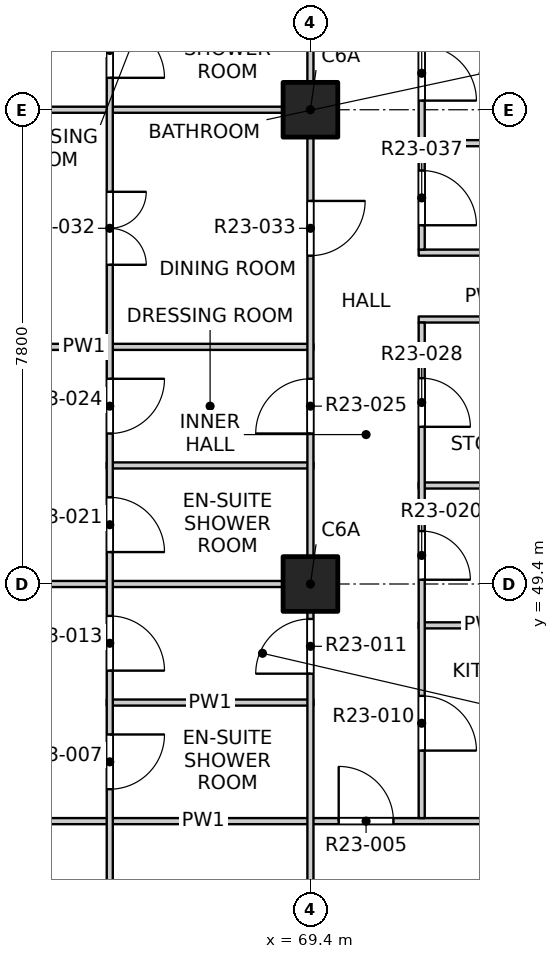
"""IFC4 building model, lengths in metres.
Left out: names, types, materials, properties, quantities, classifications, styles, units other than length and angle.
Written with IfcOpenShell. Run it as: python <this file> out.ifc"""

import sys

from ifc_helpers import new_model, si_unit, direction, frame, frame_2d, origin, origin_2d, place, context, subcontext, project, spatial, rectangle, extrude, element, fill, save


model = new_model("IFC4")
c1 = context("Model", 3, precision=1e-05, world=origin(), true_north=direction((0.0, 1.0)))
c2 = subcontext(c1, "Body", "Model", "MODEL_VIEW")
j1 = project(units=[si_unit("LENGTHUNIT", "METRE"), si_unit("PLANEANGLEUNIT", "RADIAN")], contexts=[c1])
p1 = place(None, origin())
s1 = spatial("IfcSite", under=j1, at=p1, CompositionType="ELEMENT")
p2 = place(p1, origin())
s2 = spatial("IfcBuilding", under=s1, at=p2, CompositionType="ELEMENT")
p3 = place(p2, frame((0.0, 0.0, 234.7)))
s3 = spatial("IfcBuildingStorey", under=s2, at=p3, CompositionType="ELEMENT", Elevation=234.7)
for number, where, z_axis, x_axis in (
    (1, (69.4, 49.4, -0.25), (0.0, 0.0, 1.0), (1.0, 0.0, 0.0)),
    (2, (69.4, 57.2, -0.25), (0.0, 0.0, 1.0), (1.0, 0.0, 0.0)),
):
    element("IfcColumn", number, at=place(p3, frame(where, z_axis=z_axis, x_axis=x_axis)), inside=s3, PredefinedType="COLUMN", context=c2, shape_type="SweptSolid", body=[
        extrude(rectangle(XDim=0.9, YDim=0.9, at=origin_2d()), origin(), (0.0, 0.0, 1.0), 3.4),
    ])
p4 = place(p3, frame((61.9, 45.5, 0.0), z_axis=(0.0, 0.0, 1.0), x_axis=(1.0, 0.0, 0.0)))
e3 = element("IfcWall", 3, at=p4, inside=s3, PredefinedType="PARTITIONING", context=c2, shape_type="SweptSolid", body=[
    extrude(rectangle(XDim=11.475, YDim=0.1, at=frame_2d((5.737, 0.0))), origin(), (0.0, 0.0, 1.0), 3.15),
])
p5 = place(p4, frame((7.965, 0.0, 0.0)))
e4 = element("IfcOpeningElement", 4, at=p5, cuts=e3, PredefinedType="OPENING", context=c2, shape_type="SweptSolid", body=[
    extrude(rectangle(XDim=0.9, YDim=2.1, at=frame_2d((0.45, 1.05))), frame((0.0, 0.06, 0.0), z_axis=(0.0, -1.0, 0.0), x_axis=(1.0, 0.0, 0.0)), (0.0, 0.0, 1.0), 0.12),
])
p6 = place(p3, frame((66.05, 47.45, 0.0), z_axis=(0.0, 0.0, 1.0), x_axis=(1.0, 0.0, 0.0)))
e5 = element("IfcWall", 5, at=p6, inside=s3, PredefinedType="PARTITIONING", context=c2, shape_type="SweptSolid", body=[
    extrude(rectangle(XDim=3.4, YDim=0.1, at=frame_2d((1.7, 0.0))), origin(), (0.0, 0.0, 1.0), 3.15),
])
p7 = place(p3, frame((71.18, 48.72, 0.0), z_axis=(0.0, 0.0, 1.0), x_axis=(1.0, 0.0, 0.0)))
e6 = element("IfcWall", 6, at=p7, inside=s3, PredefinedType="PARTITIONING", context=c2, shape_type="SweptSolid", body=[
    extrude(rectangle(XDim=2.195, YDim=0.1, at=frame_2d((1.097, 0.0))), origin(), (0.0, 0.0, 1.0), 3.15),
])
p8 = place(p3, frame((61.9, 49.4, 0.0), z_axis=(0.0, 0.0, 1.0), x_axis=(1.0, 0.0, 0.0)))
e7 = element("IfcWall", 7, at=p8, inside=s3, PredefinedType="PARTITIONING", context=c2, shape_type="SweptSolid", body=[
    extrude(rectangle(XDim=7.55, YDim=0.1, at=frame_2d((3.775, 0.0))), origin(), (0.0, 0.0, 1.0), 3.15),
])
p9 = place(p3, frame((71.18, 51.02, 0.0), z_axis=(0.0, 0.0, 1.0), x_axis=(1.0, 0.0, 0.0)))
e8 = element("IfcWall", 8, at=p9, inside=s3, PredefinedType="PARTITIONING", context=c2, shape_type="SweptSolid", body=[
    extrude(rectangle(XDim=2.22, YDim=0.1, at=frame_2d((1.11, 0.0))), origin(), (0.0, 0.0, 1.0), 3.15),
])
p10 = place(p3, frame((66.05, 51.35, 0.0), z_axis=(0.0, 0.0, 1.0), x_axis=(1.0, 0.0, 0.0)))
e9 = element("IfcWall", 9, at=p10, inside=s3, PredefinedType="PARTITIONING", context=c2, shape_type="SweptSolid", body=[
    extrude(rectangle(XDim=3.4, YDim=0.1, at=frame_2d((1.7, 0.0))), origin(), (0.0, 0.0, 1.0), 3.15),
])
p11 = place(p3, frame((61.9, 53.3, 0.0), z_axis=(0.0, 0.0, 1.0), x_axis=(1.0, 0.0, 0.0)))
e10 = element("IfcWall", 10, at=p11, inside=s3, PredefinedType="PARTITIONING", context=c2, shape_type="SweptSolid", body=[
    extrude(rectangle(XDim=7.55, YDim=0.1, at=frame_2d((3.775, 0.0))), origin(), (0.0, 0.0, 1.0), 3.15),
])
for number, where, z_axis, x_axis in (
    (11, (71.18, 53.75, 0.0), (0.0, 0.0, 1.0), (1.0, 0.0, 0.0)),
    (12, (71.18, 54.85, 0.0), (0.0, 0.0, 1.0), (1.0, 0.0, 0.0)),
    (13, (71.18, 56.65, 0.0), (0.0, 0.0, 1.0), (1.0, 0.0, 0.0)),
):
    element("IfcWall", number, at=place(p3, frame(where, z_axis=z_axis, x_axis=x_axis)), inside=s3, PredefinedType="PARTITIONING", context=c2, shape_type="SweptSolid", body=[
        extrude(rectangle(XDim=2.22, YDim=0.1, at=frame_2d((1.11, 0.0))), origin(), (0.0, 0.0, 1.0), 3.15),
    ])
p12 = place(p3, frame((61.9, 57.2, 0.0), z_axis=(0.0, 0.0, 1.0), x_axis=(1.0, 0.0, 0.0)))
e14 = element("IfcWall", 14, at=p12, inside=s3, PredefinedType="PARTITIONING", context=c2, shape_type="SweptSolid", body=[
    extrude(rectangle(XDim=7.55, YDim=0.1, at=frame_2d((3.775, 0.0))), origin(), (0.0, 0.0, 1.0), 3.15),
])
p13 = place(p3, frame((66.1, 41.9, 0.0), z_axis=(0.0, 0.0, 1.0), x_axis=(0.0, 1.0, 0.0)))
e15 = element("IfcWall", 15, at=p13, inside=s3, PredefinedType="PARTITIONING", context=c2, shape_type="SweptSolid", body=[
    extrude(rectangle(XDim=19.1, YDim=0.1, at=frame_2d((9.55, 0.0))), origin(), (0.0, 0.0, 1.0), 3.15),
])
p14 = place(p13, frame((1.05, 0.0, 0.0)))
e16 = element("IfcOpeningElement", 16, at=p14, cuts=e15, PredefinedType="OPENING", context=c2, shape_type="SweptSolid", body=[
    extrude(rectangle(XDim=1.2, YDim=2.1, at=frame_2d((0.6, 1.05))), frame((0.0, 0.06, 0.0), z_axis=(0.0, -1.0, 0.0), x_axis=(1.0, 0.0, 0.0)), (0.0, 0.0, 1.0), 0.12),
])
p15 = place(p13, frame((4.125, 0.0, 0.0)))
e17 = element("IfcOpeningElement", 17, at=p15, cuts=e15, PredefinedType="OPENING", context=c2, shape_type="SweptSolid", body=[
    extrude(rectangle(XDim=0.9, YDim=2.1, at=frame_2d((0.45, 1.05))), frame((0.0, 0.06, 0.0), z_axis=(0.0, -1.0, 0.0), x_axis=(1.0, 0.0, 0.0)), (0.0, 0.0, 1.0), 0.12),
])
p16 = place(p13, frame((6.075, 0.0, 0.0)))
e18 = element("IfcOpeningElement", 18, at=p16, cuts=e15, PredefinedType="OPENING", context=c2, shape_type="SweptSolid", body=[
    extrude(rectangle(XDim=0.9, YDim=2.1, at=frame_2d((0.45, 1.05))), frame((0.0, 0.06, 0.0), z_axis=(0.0, -1.0, 0.0), x_axis=(1.0, 0.0, 0.0)), (0.0, 0.0, 1.0), 0.12),
])
p17 = place(p13, frame((8.025, 0.0, 0.0)))
e19 = element("IfcOpeningElement", 19, at=p17, cuts=e15, PredefinedType="OPENING", context=c2, shape_type="SweptSolid", body=[
    extrude(rectangle(XDim=0.9, YDim=2.1, at=frame_2d((0.45, 1.05))), frame((0.0, 0.06, 0.0), z_axis=(0.0, -1.0, 0.0), x_axis=(1.0, 0.0, 0.0)), (0.0, 0.0, 1.0), 0.12),
])
p18 = place(p13, frame((9.975, 0.0, 0.0)))
e20 = element("IfcOpeningElement", 20, at=p18, cuts=e15, PredefinedType="OPENING", context=c2, shape_type="SweptSolid", body=[
    extrude(rectangle(XDim=0.9, YDim=2.1, at=frame_2d((0.45, 1.05))), frame((0.0, 0.06, 0.0), z_axis=(0.0, -1.0, 0.0), x_axis=(1.0, 0.0, 0.0)), (0.0, 0.0, 1.0), 0.12),
])
p19 = place(p13, frame((12.75, 0.0, 0.0)))
e21 = element("IfcOpeningElement", 21, at=p19, cuts=e15, PredefinedType="OPENING", context=c2, shape_type="SweptSolid", body=[
    extrude(rectangle(XDim=1.2, YDim=2.1, at=frame_2d((0.6, 1.05))), frame((0.0, 0.06, 0.0), z_axis=(0.0, -1.0, 0.0), x_axis=(1.0, 0.0, 0.0)), (0.0, 0.0, 1.0), 0.12),
])
p20 = place(p13, frame((15.825, 0.0, 0.0)))
e22 = element("IfcOpeningElement", 22, at=p20, cuts=e15, PredefinedType="OPENING", context=c2, shape_type="SweptSolid", body=[
    extrude(rectangle(XDim=0.9, YDim=2.1, at=frame_2d((0.45, 1.05))), frame((0.0, 0.06, 0.0), z_axis=(0.0, -1.0, 0.0), x_axis=(1.0, 0.0, 0.0)), (0.0, 0.0, 1.0), 0.12),
])
p21 = place(p13, frame((17.775, 0.0, 0.0)))
e23 = element("IfcOpeningElement", 23, at=p21, cuts=e15, PredefinedType="OPENING", context=c2, shape_type="SweptSolid", body=[
    extrude(rectangle(XDim=0.9, YDim=2.1, at=frame_2d((0.45, 1.05))), frame((0.0, 0.06, 0.0), z_axis=(0.0, -1.0, 0.0), x_axis=(1.0, 0.0, 0.0)), (0.0, 0.0, 1.0), 0.12),
])
p22 = place(p3, frame((69.4, 41.9, 0.0), z_axis=(0.0, 0.0, 1.0), x_axis=(0.0, 1.0, 0.0)))
e24 = element("IfcWall", 24, at=p22, inside=s3, PredefinedType="PARTITIONING", context=c2, shape_type="SweptSolid", body=[
    extrude(rectangle(XDim=46.2, YDim=0.1, at=frame_2d((23.1, 0.0))), origin(), (0.0, 0.0, 1.0), 3.15),
])
p23 = place(p22, frame((1.2, 0.0, 0.0)))
e25 = element("IfcOpeningElement", 25, at=p23, cuts=e24, PredefinedType="OPENING", context=c2, shape_type="SweptSolid", body=[
    extrude(rectangle(XDim=0.9, YDim=2.1, at=frame_2d((0.45, 1.05))), frame((0.0, 0.06, 0.0), z_axis=(0.0, -1.0, 0.0), x_axis=(1.0, 0.0, 0.0)), (0.0, 0.0, 1.0), 0.12),
])
p24 = place(p22, frame((6.025, 0.0, 0.0)))
e26 = element("IfcOpeningElement", 26, at=p24, cuts=e24, PredefinedType="OPENING", context=c2, shape_type="SweptSolid", body=[
    extrude(rectangle(XDim=0.9, YDim=2.1, at=frame_2d((0.45, 1.05))), frame((0.0, 0.06, 0.0), z_axis=(0.0, -1.0, 0.0), x_axis=(1.0, 0.0, 0.0)), (0.0, 0.0, 1.0), 0.12),
])
p25 = place(p22, frame((9.975, 0.0, 0.0)))
e27 = element("IfcOpeningElement", 27, at=p25, cuts=e24, PredefinedType="OPENING", context=c2, shape_type="SweptSolid", body=[
    extrude(rectangle(XDim=0.9, YDim=2.1, at=frame_2d((0.45, 1.05))), frame((0.0, 0.06, 0.0), z_axis=(0.0, -1.0, 0.0), x_axis=(1.0, 0.0, 0.0)), (0.0, 0.0, 1.0), 0.12),
])
p26 = place(p22, frame((12.9, 0.0, 0.0)))
e28 = element("IfcOpeningElement", 28, at=p26, cuts=e24, PredefinedType="OPENING", context=c2, shape_type="SweptSolid", body=[
    extrude(rectangle(XDim=0.9, YDim=2.1, at=frame_2d((0.45, 1.05))), frame((0.0, 0.06, 0.0), z_axis=(0.0, -1.0, 0.0), x_axis=(1.0, 0.0, 0.0)), (0.0, 0.0, 1.0), 0.12),
])
p27 = place(p22, frame((17.775, 0.0, 0.0)))
e29 = element("IfcOpeningElement", 29, at=p27, cuts=e24, PredefinedType="OPENING", context=c2, shape_type="SweptSolid", body=[
    extrude(rectangle(XDim=0.9, YDim=2.1, at=frame_2d((0.45, 1.05))), frame((0.0, 0.06, 0.0), z_axis=(0.0, -1.0, 0.0), x_axis=(1.0, 0.0, 0.0)), (0.0, 0.0, 1.0), 0.12),
])
p28 = place(p22, frame((21.625, 0.0, 0.0)))
e30 = element("IfcOpeningElement", 30, at=p28, cuts=e24, PredefinedType="OPENING", context=c2, shape_type="SweptSolid", body=[
    extrude(rectangle(XDim=0.9, YDim=2.1, at=frame_2d((0.45, 1.05))), frame((0.0, 0.06, 0.0), z_axis=(0.0, -1.0, 0.0), x_axis=(1.0, 0.0, 0.0)), (0.0, 0.0, 1.0), 0.12),
])
p29 = place(p22, frame((25.575, 0.0, 0.0)))
e31 = element("IfcOpeningElement", 31, at=p29, cuts=e24, PredefinedType="OPENING", context=c2, shape_type="SweptSolid", body=[
    extrude(rectangle(XDim=0.9, YDim=2.1, at=frame_2d((0.45, 1.05))), frame((0.0, 0.06, 0.0), z_axis=(0.0, -1.0, 0.0), x_axis=(1.0, 0.0, 0.0)), (0.0, 0.0, 1.0), 0.12),
])
p30 = place(p22, frame((28.5, 0.0, 0.0)))
e32 = element("IfcOpeningElement", 32, at=p30, cuts=e24, PredefinedType="OPENING", context=c2, shape_type="SweptSolid", body=[
    extrude(rectangle(XDim=0.9, YDim=2.1, at=frame_2d((0.45, 1.05))), frame((0.0, 0.06, 0.0), z_axis=(0.0, -1.0, 0.0), x_axis=(1.0, 0.0, 0.0)), (0.0, 0.0, 1.0), 0.12),
])
p31 = place(p22, frame((32.4, 0.0, 0.0)))
e33 = element("IfcOpeningElement", 33, at=p31, cuts=e24, PredefinedType="OPENING", context=c2, shape_type="SweptSolid", body=[
    extrude(rectangle(XDim=0.9, YDim=2.1, at=frame_2d((0.45, 1.05))), frame((0.0, 0.06, 0.0), z_axis=(0.0, -1.0, 0.0), x_axis=(1.0, 0.0, 0.0)), (0.0, 0.0, 1.0), 0.12),
])
p32 = place(p22, frame((36.3, 0.0, 0.0)))
e34 = element("IfcOpeningElement", 34, at=p32, cuts=e24, PredefinedType="OPENING", context=c2, shape_type="SweptSolid", body=[
    extrude(rectangle(XDim=0.9, YDim=2.1, at=frame_2d((0.45, 1.05))), frame((0.0, 0.06, 0.0), z_axis=(0.0, -1.0, 0.0), x_axis=(1.0, 0.0, 0.0)), (0.0, 0.0, 1.0), 0.12),
])
p33 = place(p22, frame((40.2, 0.0, 0.0)))
e35 = element("IfcOpeningElement", 35, at=p33, cuts=e24, PredefinedType="OPENING", context=c2, shape_type="SweptSolid", body=[
    extrude(rectangle(XDim=0.9, YDim=2.1, at=frame_2d((0.45, 1.05))), frame((0.0, 0.06, 0.0), z_axis=(0.0, -1.0, 0.0), x_axis=(1.0, 0.0, 0.0)), (0.0, 0.0, 1.0), 0.12),
])
p34 = place(p22, frame((44.1, 0.0, 0.0)))
e36 = element("IfcOpeningElement", 36, at=p34, cuts=e24, PredefinedType="OPENING", context=c2, shape_type="SweptSolid", body=[
    extrude(rectangle(XDim=0.9, YDim=2.1, at=frame_2d((0.45, 1.05))), frame((0.0, 0.06, 0.0), z_axis=(0.0, -1.0, 0.0), x_axis=(1.0, 0.0, 0.0)), (0.0, 0.0, 1.0), 0.12),
])
p35 = place(p3, frame((71.23, 45.55, 0.0), z_axis=(0.0, 0.0, 1.0), x_axis=(0.0, 1.0, 0.0)))
e37 = element("IfcWall", 37, at=p35, inside=s3, PredefinedType="PARTITIONING", context=c2, shape_type="SweptSolid", body=[
    extrude(rectangle(XDim=8.15, YDim=0.1, at=frame_2d((4.075, 0.0))), origin(), (0.0, 0.0, 1.0), 3.15),
])
p36 = place(p35, frame((1.11, 0.0, 0.0)))
e38 = element("IfcOpeningElement", 38, at=p36, cuts=e37, PredefinedType="OPENING", context=c2, shape_type="SweptSolid", body=[
    extrude(rectangle(XDim=0.9, YDim=2.1, at=frame_2d((0.45, 1.05))), frame((0.0, 0.06, 0.0), z_axis=(0.0, -1.0, 0.0), x_axis=(1.0, 0.0, 0.0)), (0.0, 0.0, 1.0), 0.12),
])
p37 = place(p35, frame((3.92, 0.0, 0.0)))
e39 = element("IfcOpeningElement", 39, at=p37, cuts=e37, PredefinedType="OPENING", context=c2, shape_type="SweptSolid", body=[
    extrude(rectangle(XDim=0.8, YDim=2.1, at=frame_2d((0.4, 1.05))), frame((0.0, 0.06, 0.0), z_axis=(0.0, -1.0, 0.0), x_axis=(1.0, 0.0, 0.0)), (0.0, 0.0, 1.0), 0.12),
])
p38 = place(p35, frame((6.435, 0.0, 0.0)))
e40 = element("IfcOpeningElement", 40, at=p38, cuts=e37, PredefinedType="OPENING", context=c2, shape_type="SweptSolid", body=[
    extrude(rectangle(XDim=0.8, YDim=2.1, at=frame_2d((0.4, 1.05))), frame((0.0, 0.06, 0.0), z_axis=(0.0, -1.0, 0.0), x_axis=(1.0, 0.0, 0.0)), (0.0, 0.0, 1.0), 0.12),
])
p39 = place(p3, frame((71.23, 54.9, 0.0), z_axis=(0.0, 0.0, 1.0), x_axis=(0.0, 1.0, 0.0)))
e41 = element("IfcWall", 41, at=p39, inside=s3, PredefinedType="PARTITIONING", context=c2, shape_type="SweptSolid", body=[
    extrude(rectangle(XDim=7.85, YDim=0.1, at=frame_2d((3.925, 0.0))), origin(), (0.0, 0.0, 1.0), 3.15),
])
p40 = place(p39, frame((0.4, 0.0, 0.0)))
e42 = element("IfcOpeningElement", 42, at=p40, cuts=e41, PredefinedType="OPENING", context=c2, shape_type="SweptSolid", body=[
    extrude(rectangle(XDim=0.9, YDim=2.1, at=frame_2d((0.45, 1.05))), frame((0.0, 0.06, 0.0), z_axis=(0.0, -1.0, 0.0), x_axis=(1.0, 0.0, 0.0)), (0.0, 0.0, 1.0), 0.12),
])
p41 = place(p39, frame((2.45, 0.0, 0.0)))
e43 = element("IfcOpeningElement", 43, at=p41, cuts=e41, PredefinedType="OPENING", context=c2, shape_type="SweptSolid", body=[
    extrude(rectangle(XDim=0.9, YDim=2.1, at=frame_2d((0.45, 1.05))), frame((0.0, 0.06, 0.0), z_axis=(0.0, -1.0, 0.0), x_axis=(1.0, 0.0, 0.0)), (0.0, 0.0, 1.0), 0.12),
])
p42 = place(p39, frame((4.725, 0.0, 0.0)))
e44 = element("IfcOpeningElement", 44, at=p42, cuts=e41, PredefinedType="OPENING", context=c2, shape_type="SweptSolid", body=[
    extrude(rectangle(XDim=0.8, YDim=2.1, at=frame_2d((0.4, 1.05))), frame((0.0, 0.06, 0.0), z_axis=(0.0, -1.0, 0.0), x_axis=(1.0, 0.0, 0.0)), (0.0, 0.0, 1.0), 0.12),
])
p43 = place(p39, frame((6.65, 0.0, 0.0)))
e45 = element("IfcOpeningElement", 45, at=p43, cuts=e41, PredefinedType="OPENING", context=c2, shape_type="SweptSolid", body=[
    extrude(rectangle(XDim=0.8, YDim=2.1, at=frame_2d((0.4, 1.05))), frame((0.0, 0.06, 0.0), z_axis=(0.0, -1.0, 0.0), x_axis=(1.0, 0.0, 0.0)), (0.0, 0.0, 1.0), 0.12),
])
p44 = place(p5, origin())
e46 = element("IfcDoor", 46, at=p44, inside=s3, OperationType="SINGLE_SWING_LEFT", PredefinedType="DOOR", context=c2, shape_type="SweptSolid", body=[
    extrude(rectangle(XDim=0.9, YDim=2.1, at=frame_2d((0.45, 1.05))), frame((0.0, 0.025, 0.0), z_axis=(0.0, -1.0, 0.0), x_axis=(1.0, 0.0, 0.0)), (0.0, 0.0, 1.0), 0.05),
])
fill(e4, e46)
p45 = place(p15, origin())
e47 = element("IfcDoor", 47, at=p45, inside=s3, OperationType="SINGLE_SWING_LEFT", PredefinedType="DOOR", context=c2, shape_type="SweptSolid", body=[
    extrude(rectangle(XDim=0.9, YDim=2.1, at=frame_2d((0.45, 1.05))), frame((0.0, 0.025, 0.0), z_axis=(0.0, -1.0, 0.0), x_axis=(1.0, 0.0, 0.0)), (0.0, 0.0, 1.0), 0.05),
])
fill(e17, e47)
p46 = place(p36, origin())
e48 = element("IfcDoor", 48, at=p46, inside=s3, OperationType="SINGLE_SWING_RIGHT", PredefinedType="DOOR", context=c2, shape_type="SweptSolid", body=[
    extrude(rectangle(XDim=0.9, YDim=2.1, at=frame_2d((0.45, 1.05))), frame((0.0, 0.025, 0.0), z_axis=(0.0, -1.0, 0.0), x_axis=(1.0, 0.0, 0.0)), (0.0, 0.0, 1.0), 0.05),
])
fill(e38, e48)
p47 = place(p24, origin())
e49 = element("IfcDoor", 49, at=p47, inside=s3, OperationType="SINGLE_SWING_LEFT", PredefinedType="DOOR", context=c2, shape_type="SweptSolid", body=[
    extrude(rectangle(XDim=0.9, YDim=2.1, at=frame_2d((0.45, 1.05))), frame((0.0, 0.025, 0.0), z_axis=(0.0, -1.0, 0.0), x_axis=(1.0, 0.0, 0.0)), (0.0, 0.0, 1.0), 0.05),
])
fill(e26, e49)
p48 = place(p16, origin())
e50 = element("IfcDoor", 50, at=p48, inside=s3, OperationType="SINGLE_SWING_RIGHT", PredefinedType="DOOR", context=c2, shape_type="SweptSolid", body=[
    extrude(rectangle(XDim=0.9, YDim=2.1, at=frame_2d((0.45, 1.05))), frame((0.0, 0.025, 0.0), z_axis=(0.0, -1.0, 0.0), x_axis=(1.0, 0.0, 0.0)), (0.0, 0.0, 1.0), 0.05),
])
fill(e18, e50)
p49 = place(p37, origin())
e51 = element("IfcDoor", 51, at=p49, inside=s3, OperationType="SINGLE_SWING_RIGHT", PredefinedType="DOOR", context=c2, shape_type="SweptSolid", body=[
    extrude(rectangle(XDim=0.8, YDim=2.1, at=frame_2d((0.4, 1.05))), frame((0.0, 0.025, 0.0), z_axis=(0.0, -1.0, 0.0), x_axis=(1.0, 0.0, 0.0)), (0.0, 0.0, 1.0), 0.05),
])
fill(e39, e51)
p50 = place(p17, origin())
e52 = element("IfcDoor", 52, at=p50, inside=s3, OperationType="SINGLE_SWING_RIGHT", PredefinedType="DOOR", context=c2, shape_type="SweptSolid", body=[
    extrude(rectangle(XDim=0.9, YDim=2.1, at=frame_2d((0.45, 1.05))), frame((0.0, 0.025, 0.0), z_axis=(0.0, -1.0, 0.0), x_axis=(1.0, 0.0, 0.0)), (0.0, 0.0, 1.0), 0.05),
])
fill(e19, e52)
p51 = place(p18, origin())
e53 = element("IfcDoor", 53, at=p51, inside=s3, OperationType="SINGLE_SWING_LEFT", PredefinedType="DOOR", context=c2, shape_type="SweptSolid", body=[
    extrude(rectangle(XDim=0.9, YDim=2.1, at=frame_2d((0.45, 1.05))), frame((0.0, 0.025, 0.0), z_axis=(0.0, -1.0, 0.0), x_axis=(1.0, 0.0, 0.0)), (0.0, 0.0, 1.0), 0.05),
])
fill(e20, e53)
p52 = place(p25, origin())
e54 = element("IfcDoor", 54, at=p52, inside=s3, OperationType="SINGLE_SWING_LEFT", PredefinedType="DOOR", context=c2, shape_type="SweptSolid", body=[
    extrude(rectangle(XDim=0.9, YDim=2.1, at=frame_2d((0.45, 1.05))), frame((0.0, 0.025, 0.0), z_axis=(0.0, -1.0, 0.0), x_axis=(1.0, 0.0, 0.0)), (0.0, 0.0, 1.0), 0.05),
])
fill(e27, e54)
p53 = place(p38, origin())
e55 = element("IfcDoor", 55, at=p53, inside=s3, OperationType="SINGLE_SWING_RIGHT", PredefinedType="DOOR", context=c2, shape_type="SweptSolid", body=[
    extrude(rectangle(XDim=0.8, YDim=2.1, at=frame_2d((0.4, 1.05))), frame((0.0, 0.025, 0.0), z_axis=(0.0, -1.0, 0.0), x_axis=(1.0, 0.0, 0.0)), (0.0, 0.0, 1.0), 0.05),
])
fill(e40, e55)
p54 = place(p19, origin())
e56 = element("IfcDoor", 56, at=p54, inside=s3, OperationType="DOUBLE_DOOR_SINGLE_SWING", PredefinedType="DOOR", context=c2, shape_type="SweptSolid", body=[
    extrude(rectangle(XDim=1.2, YDim=2.1, at=frame_2d((0.6, 1.05))), frame((0.0, 0.025, 0.0), z_axis=(0.0, -1.0, 0.0), x_axis=(1.0, 0.0, 0.0)), (0.0, 0.0, 1.0), 0.05),
])
fill(e21, e56)
p55 = place(p26, origin())
e57 = element("IfcDoor", 57, at=p55, inside=s3, OperationType="SINGLE_SWING_LEFT", PredefinedType="DOOR", context=c2, shape_type="SweptSolid", body=[
    extrude(rectangle(XDim=0.9, YDim=2.1, at=frame_2d((0.45, 1.05))), frame((0.0, 0.025, 0.0), z_axis=(0.0, -1.0, 0.0), x_axis=(1.0, 0.0, 0.0)), (0.0, 0.0, 1.0), 0.05),
])
fill(e28, e57)
p56 = place(p40, origin())
e58 = element("IfcDoor", 58, at=p56, inside=s3, OperationType="SINGLE_SWING_RIGHT", PredefinedType="DOOR", context=c2, shape_type="SweptSolid", body=[
    extrude(rectangle(XDim=0.9, YDim=2.1, at=frame_2d((0.45, 1.05))), frame((0.0, 0.025, 0.0), z_axis=(0.0, -1.0, 0.0), x_axis=(1.0, 0.0, 0.0)), (0.0, 0.0, 1.0), 0.05),
])
fill(e42, e58)
p57 = place(p41, origin())
e59 = element("IfcDoor", 59, at=p57, inside=s3, OperationType="SINGLE_SWING_RIGHT", PredefinedType="DOOR", context=c2, shape_type="SweptSolid", body=[
    extrude(rectangle(XDim=0.9, YDim=2.1, at=frame_2d((0.45, 1.05))), frame((0.0, 0.025, 0.0), z_axis=(0.0, -1.0, 0.0), x_axis=(1.0, 0.0, 0.0)), (0.0, 0.0, 1.0), 0.05),
])
fill(e43, e59)
p58 = place(p20, origin())
e60 = element("IfcDoor", 60, at=p58, inside=s3, OperationType="SINGLE_SWING_RIGHT", PredefinedType="DOOR", context=c2, shape_type="SweptSolid", body=[
    extrude(rectangle(XDim=0.9, YDim=2.1, at=frame_2d((0.45, 1.05))), frame((0.0, 0.025, 0.0), z_axis=(0.0, -1.0, 0.0), x_axis=(1.0, 0.0, 0.0)), (0.0, 0.0, 1.0), 0.05),
])
fill(e22, e60)
save(model, sys.argv[1])
